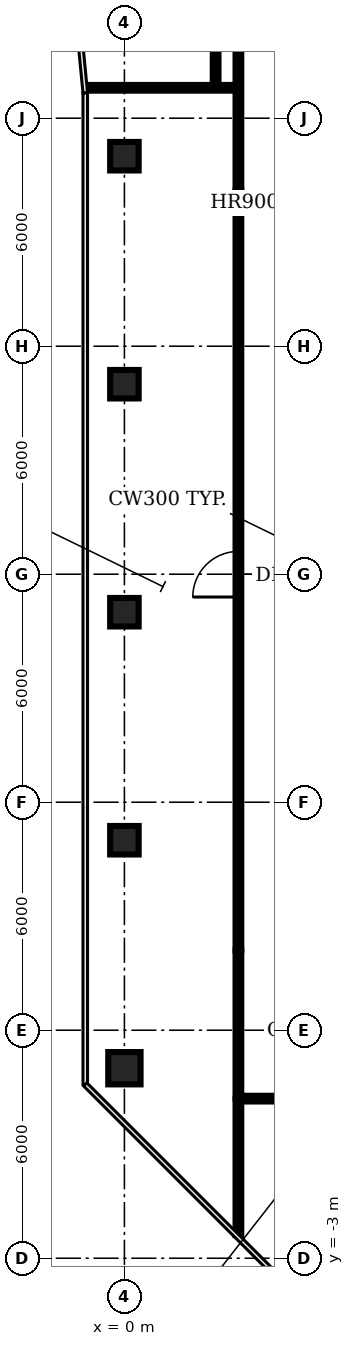
"""IFC4 building model, lengths in metres.
Left out: names, types, materials, properties, quantities, classifications, styles, units other than length and angle.
Written with IfcOpenShell. Run it as: python <this file> out.ifc"""

import sys

from ifc_helpers import new_model, si_unit, direction, frame, frame_2d, origin, origin_2d, place, context, subcontext, project, spatial, rectangle, circle, extrude, element, fill, save


model = new_model("IFC4")
c1 = context("Model", 3, precision=1e-05, world=origin(), true_north=direction((0.0, 1.0)))
c2 = subcontext(c1, "Body", "Model", "MODEL_VIEW")
j1 = project(units=[si_unit("LENGTHUNIT", "METRE"), si_unit("PLANEANGLEUNIT", "RADIAN")], contexts=[c1])
p1 = place(None, origin())
s1 = spatial("IfcSite", under=j1, at=p1, CompositionType="ELEMENT")
p2 = place(p1, origin())
s2 = spatial("IfcBuilding", under=s1, at=p2, CompositionType="ELEMENT")
p3 = place(p2, frame((0.0, 0.0, 310.4)))
s3 = spatial("IfcBuildingStorey", under=s2, at=p3, CompositionType="ELEMENT", Elevation=310.4)
p4 = place(p3, frame((0.0, 2.0, 0.0), z_axis=(0.0, 0.0, 1.0), x_axis=(1.0, 0.0, 0.0)))
e1 = element("IfcColumn", 1, at=p4, inside=s3, PredefinedType="COLUMN", context=c2, shape_type="SweptSolid", body=[
    extrude(circle(Radius=0.425, at=origin_2d()), origin(), (0.0, 0.0, 1.0), 3.9),
])
for number, where, z_axis, x_axis in (
    (2, (0.0, 8.0, 0.0), (0.0, 0.0, 1.0), (1.0, 0.0, 0.0)),
    (3, (0.0, 14.0, 0.0), (0.0, 0.0, 1.0), (1.0, 0.0, 0.0)),
    (4, (0.0, 20.0, 0.0), (0.0, 0.0, 1.0), (1.0, 0.0, 0.0)),
    (5, (0.0, 26.0, 0.0), (0.0, 0.0, 1.0), (1.0, 0.0, 0.0)),
):
    element("IfcColumn", number, at=place(p3, frame(where, z_axis=z_axis, x_axis=x_axis)), inside=s3, PredefinedType="COLUMN", context=c2, shape_type="SweptSolid", body=[
        extrude(rectangle(XDim=0.75, YDim=0.75, at=origin_2d()), origin(), (0.0, 0.0, 1.0), 3.9),
    ])
p5 = place(p3, frame((-0.968, 27.8, 0.0), z_axis=(0.0, 0.0, 1.0), x_axis=(1.0, 0.0, 0.0)))
e6 = element("IfcWall", 6, at=p5, inside=s3, PredefinedType="PARTITIONING", context=c2, shape_type="SweptSolid", body=[
    extrude(rectangle(XDim=3.968, YDim=0.15, at=frame_2d((1.984, 0.0))), origin(), (0.0, 0.0, 1.0), 2.48),
])
p6 = place(p3, frame((2.4, 27.8, 0.0), z_axis=(0.0, 0.0, 1.0), x_axis=(0.0, 1.0, 0.0)))
e7 = element("IfcWall", 7, at=p6, inside=s3, PredefinedType="PARTITIONING", context=c2, shape_type="SweptSolid", body=[
    extrude(rectangle(XDim=6.0, YDim=0.15, at=frame_2d((3.0, 0.0))), origin(), (0.0, 0.0, 1.0), 2.48),
])
p7 = place(p3, frame((3.0, -2.39, 0.0), z_axis=(0.0, 0.0, 1.0), x_axis=(0.0, 1.0, 0.0)))
e8 = element("IfcWall", 8, at=p7, inside=s3, PredefinedType="PARTITIONING", context=c2, shape_type="SweptSolid", body=[
    extrude(rectangle(XDim=3.59, YDim=0.15, at=frame_2d((1.795, 0.0))), origin(), (0.0, 0.0, 1.0), 2.48),
])
p8 = place(p3, frame((3.0, 1.2, 0.0), z_axis=(0.0, 0.0, 1.0), x_axis=(0.0, 1.0, 0.0)))
e9 = element("IfcWall", 9, at=p8, inside=s3, PredefinedType="PARTITIONING", context=c2, shape_type="SweptSolid", body=[
    extrude(rectangle(XDim=3.9, YDim=0.15, at=frame_2d((1.95, 0.0))), origin(), (0.0, 0.0, 1.0), 2.48),
])
p9 = place(p3, frame((3.0, 5.1, 0.0), z_axis=(0.0, 0.0, 1.0), x_axis=(0.0, 1.0, 0.0)))
e10 = element("IfcWall", 10, at=p9, inside=s3, PredefinedType="PARTITIONING", context=c2, shape_type="SweptSolid", body=[
    extrude(rectangle(XDim=20.0, YDim=0.15, at=frame_2d((10.0, 0.0))), origin(), (0.0, 0.0, 1.0), 2.48),
])
p10 = place(p9, frame((9.3, 0.0, 0.0)))
e11 = element("IfcOpeningElement", 11, at=p10, cuts=e10, PredefinedType="OPENING", context=c2, shape_type="SweptSolid", body=[
    extrude(rectangle(XDim=1.2, YDim=2.1, at=frame_2d((0.6, 1.05))), frame((0.0, 0.085, 0.0), z_axis=(0.0, -1.0, 0.0), x_axis=(1.0, 0.0, 0.0)), (0.0, 0.0, 1.0), 0.17),
])
p11 = place(p3, frame((3.0, 25.1, 0.0), z_axis=(0.0, 0.0, 1.0), x_axis=(0.0, 1.0, 0.0)))
e12 = element("IfcWall", 12, at=p11, inside=s3, PredefinedType="PARTITIONING", context=c2, shape_type="SweptSolid", body=[
    extrude(rectangle(XDim=3.9, YDim=0.15, at=frame_2d((1.95, 0.0))), origin(), (0.0, 0.0, 1.0), 2.48),
])
p12 = place(p3, frame((27.0, 1.2, 0.0), z_axis=(0.0, 0.0, 1.0), x_axis=(-1.0, 0.0, 0.0)))
e13 = element("IfcWall", 13, at=p12, inside=s3, PredefinedType="PARTITIONING", context=c2, shape_type="SweptSolid", body=[
    extrude(rectangle(XDim=24.0, YDim=0.15, at=frame_2d((12.0, 0.0))), origin(), (0.0, 0.0, 1.0), 2.48),
])
p13 = place(p12, frame((11.5, 0.0, 0.0)))
e14 = element("IfcOpeningElement", 14, at=p13, cuts=e13, PredefinedType="OPENING", context=c2, shape_type="SweptSolid", body=[
    extrude(rectangle(XDim=1.2, YDim=2.1, at=frame_2d((0.6, 1.05))), frame((0.0, 0.085, 0.0), z_axis=(0.0, -1.0, 0.0), x_axis=(1.0, 0.0, 0.0)), (0.0, 0.0, 1.0), 0.17),
])
p14 = place(p10, origin())
e15 = element("IfcDoor", 15, at=p14, inside=s3, OperationType="SINGLE_SWING_LEFT", PredefinedType="DOOR", context=c2, shape_type="SweptSolid", body=[
    extrude(rectangle(XDim=1.2, YDim=2.1, at=frame_2d((0.6, 1.05))), frame((0.0, 0.025, 0.0), z_axis=(0.0, -1.0, 0.0), x_axis=(1.0, 0.0, 0.0)), (0.0, 0.0, 1.0), 0.05),
])
fill(e11, e15)
save(model, sys.argv[1])
